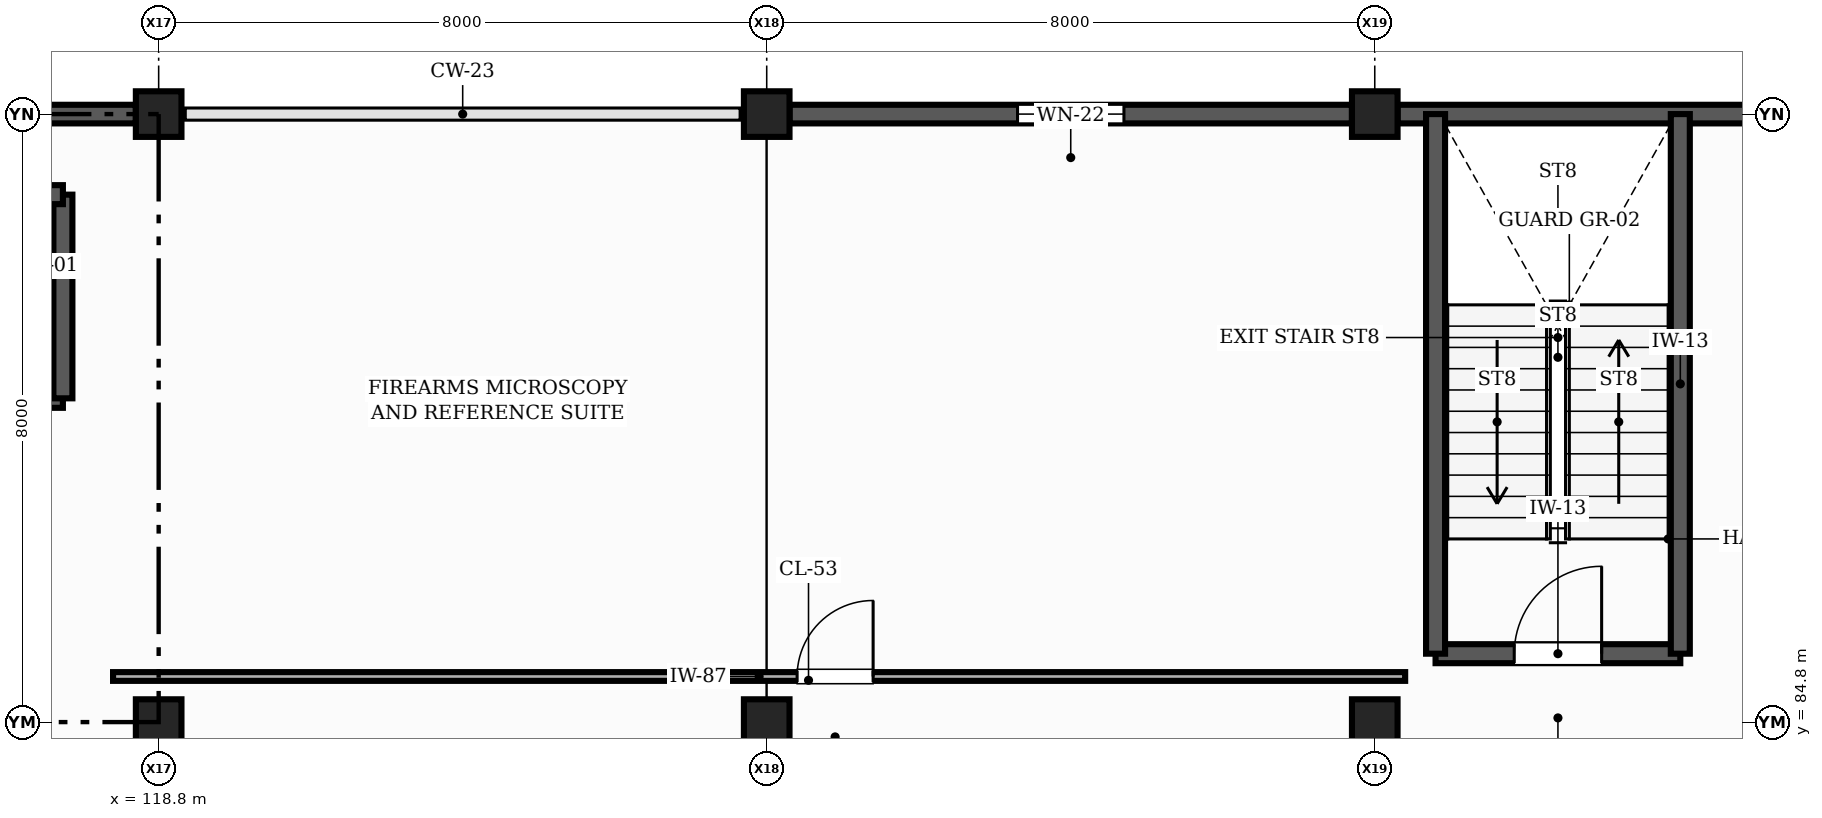
"""IFC4 building model, lengths in metres.
Left out: names, types, materials, properties, quantities, classifications, styles, units other than length and angle.
Written with IfcOpenShell. Run it as: python <this file> out.ifc"""

import sys

from ifc_helpers import new_model, si_unit, direction, frame, frame_2d, origin, origin_2d, place, context, subcontext, project, spatial, rectangle, extrude, element, fill, save


model = new_model("IFC4")
c1 = context("Model", 3, precision=1e-05, world=origin(), true_north=direction((0.0, 1.0)))
c2 = subcontext(c1, "Body", "Model", "MODEL_VIEW")
j1 = project(units=[si_unit("LENGTHUNIT", "METRE"), si_unit("PLANEANGLEUNIT", "RADIAN")], contexts=[c1])
p1 = place(None, origin())
s1 = spatial("IfcSite", under=j1, at=p1, CompositionType="ELEMENT")
p2 = place(p1, origin())
s2 = spatial("IfcBuilding", under=s1, at=p2, CompositionType="ELEMENT")
p3 = place(p2, frame((0.0, 0.0, 9.0)))
s3 = spatial("IfcBuildingStorey", under=s2, at=p3, CompositionType="ELEMENT", Elevation=9.0)
for number, where, z_axis, x_axis in (
    (1, (118.8, 84.8, 0.0), (0.0, 0.0, 1.0), (1.0, 0.0, 0.0)),
    (2, (118.8, 92.8, 0.0), (0.0, 0.0, 1.0), (1.0, 0.0, 0.0)),
    (3, (126.8, 84.8, 0.0), (0.0, 0.0, 1.0), (1.0, 0.0, 0.0)),
    (4, (126.8, 92.8, 0.0), (0.0, 0.0, 1.0), (1.0, 0.0, 0.0)),
    (5, (134.8, 84.8, 0.0), (0.0, 0.0, 1.0), (1.0, 0.0, 0.0)),
    (6, (134.8, 92.8, 0.0), (0.0, 0.0, 1.0), (1.0, 0.0, 0.0)),
):
    element("IfcColumn", number, at=place(p3, frame(where, z_axis=z_axis, x_axis=x_axis)), inside=s3, PredefinedType="COLUMN", context=c2, shape_type="SweptSolid", body=[
        extrude(rectangle(XDim=0.6, YDim=0.6, at=origin_2d()), origin(), (0.0, 0.0, 1.0), 4.5),
    ])
p4 = place(p3, frame((142.5, 92.8, 0.0), z_axis=(0.0, 0.0, 1.0), x_axis=(-1.0, 0.0, 0.0)))
e7 = element("IfcWall", 7, at=p4, inside=s3, PredefinedType="SOLIDWALL", context=c2, shape_type="SweptSolid", body=[
    extrude(rectangle(XDim=7.4, YDim=0.245, at=frame_2d((3.7, 0.0))), origin(), (0.0, 0.0, 1.0), 4.22),
])
p5 = place(p3, frame((134.5, 92.8, 0.0), z_axis=(0.0, 0.0, 1.0), x_axis=(-1.0, 0.0, 0.0)))
e8 = element("IfcWall", 8, at=p5, inside=s3, PredefinedType="SOLIDWALL", context=c2, shape_type="SweptSolid", body=[
    extrude(rectangle(XDim=7.4, YDim=0.245, at=frame_2d((3.7, 0.0))), origin(), (0.0, 0.0, 1.0), 3.57),
])
p6 = place(p5, frame((3.0, 0.0, 0.9)))
e9 = element("IfcOpeningElement", 9, at=p6, cuts=e8, PredefinedType="OPENING", context=c2, shape_type="SweptSolid", body=[
    extrude(rectangle(XDim=1.4, YDim=1.4, at=frame_2d((0.7, 0.7))), frame((0.0, 0.133, 0.0), z_axis=(0.0, -1.0, 0.0), x_axis=(1.0, 0.0, 0.0)), (0.0, 0.0, 1.0), 0.265),
])
p7 = place(p3, frame((118.5, 92.8, 0.0), z_axis=(0.0, 0.0, 1.0), x_axis=(-1.0, 0.0, 0.0)))
e10 = element("IfcWall", 10, at=p7, inside=s3, PredefinedType="SOLIDWALL", context=c2, shape_type="SweptSolid", body=[
    extrude(rectangle(XDim=7.4, YDim=0.245, at=frame_2d((3.7, 0.0))), origin(), (0.0, 0.0, 1.0), 4.22),
])
p8 = place(p3, frame((115.46, 89.06, 0.0), z_axis=(0.0, 0.0, 1.0), x_axis=(1.0, 0.0, 0.0)))
e11 = element("IfcWall", 11, at=p8, inside=s3, PredefinedType="SHEAR", context=c2, shape_type="SweptSolid", body=[
    extrude(rectangle(XDim=2.08, YDim=0.25, at=frame_2d((1.04, 0.0))), origin(), (0.0, 0.0, 1.0), 4.5),
])
p9 = place(p8, frame((0.39, 0.0, 0.0)))
e12 = element("IfcOpeningElement", 12, at=p9, cuts=e11, PredefinedType="OPENING", context=c2, shape_type="SweptSolid", body=[
    extrude(rectangle(XDim=1.3, YDim=2.25, at=frame_2d((0.65, 1.125))), frame((0.0, 0.135, 0.0), z_axis=(0.0, -1.0, 0.0), x_axis=(1.0, 0.0, 0.0)), (0.0, 0.0, 1.0), 0.27),
])
p10 = place(p3, frame((117.54, 89.06, 0.0), z_axis=(0.0, 0.0, 1.0), x_axis=(0.0, 1.0, 0.0)))
e13 = element("IfcWall", 13, at=p10, inside=s3, PredefinedType="SHEAR", context=c2, shape_type="SweptSolid", body=[
    extrude(rectangle(XDim=2.68, YDim=0.25, at=frame_2d((1.34, 0.0))), origin(), (0.0, 0.0, 1.0), 4.5),
])
p11 = place(p3, frame((117.54, 91.74, 0.0), z_axis=(0.0, 0.0, 1.0), x_axis=(-1.0, 0.0, 0.0)))
e14 = element("IfcWall", 14, at=p11, inside=s3, PredefinedType="SHEAR", context=c2, shape_type="SweptSolid", body=[
    extrude(rectangle(XDim=2.08, YDim=0.25, at=frame_2d((1.04, 0.0))), origin(), (0.0, 0.0, 1.0), 4.5),
])
p12 = place(p3, frame((135.6, 85.7, 0.0), z_axis=(0.0, 0.0, 1.0), x_axis=(1.0, 0.0, 0.0)))
e15 = element("IfcWall", 15, at=p12, inside=s3, PredefinedType="SHEAR", context=c2, shape_type="SweptSolid", body=[
    extrude(rectangle(XDim=3.22, YDim=0.25, at=frame_2d((1.61, 0.0))), origin(), (0.0, 0.0, 1.0), 4.5),
])
p13 = place(p12, frame((1.035, 0.0, 0.0)))
e16 = element("IfcOpeningElement", 16, at=p13, cuts=e15, PredefinedType="OPENING", context=c2, shape_type="SweptSolid", body=[
    extrude(rectangle(XDim=1.15, YDim=2.15, at=frame_2d((0.575, 1.075))), frame((0.0, 0.135, 0.0), z_axis=(0.0, -1.0, 0.0), x_axis=(1.0, 0.0, 0.0)), (0.0, 0.0, 1.0), 0.27),
])
for number, where, z_axis, x_axis in (
    (17, (138.82, 85.7, 0.0), (0.0, 0.0, 1.0), (0.0, 1.0, 0.0)),
    (18, (135.6, 92.8, 0.0), (0.0, 0.0, 1.0), (0.0, -1.0, 0.0)),
):
    element("IfcWall", number, at=place(p3, frame(where, z_axis=z_axis, x_axis=x_axis)), inside=s3, PredefinedType="SHEAR", context=c2, shape_type="SweptSolid", body=[
        extrude(rectangle(XDim=7.1, YDim=0.25, at=frame_2d((3.55, 0.0))), origin(), (0.0, 0.0, 1.0), 4.5),
    ])
p14 = place(p3, frame((118.2, 85.4, 0.0), z_axis=(0.0, 0.0, 1.0), x_axis=(1.0, 0.0, 0.0)))
e19 = element("IfcWall", 19, at=p14, inside=s3, PredefinedType="PARTITIONING", context=c2, shape_type="SweptSolid", body=[
    extrude(rectangle(XDim=17.0, YDim=0.115, at=frame_2d((8.5, 0.0))), origin(), (0.0, 0.0, 1.0), 3.605),
])
p15 = place(p14, frame((9.0, 0.0, 0.0)))
e20 = element("IfcOpeningElement", 20, at=p15, cuts=e19, PredefinedType="OPENING", context=c2, shape_type="SweptSolid", body=[
    extrude(rectangle(XDim=1.0, YDim=2.1, at=frame_2d((0.5, 1.05))), frame((0.0, 0.067, 0.0), z_axis=(0.0, -1.0, 0.0), x_axis=(1.0, 0.0, 0.0)), (0.0, 0.0, 1.0), 0.135),
])
p16 = place(p6, origin())
e21 = element("IfcWindow", 21, at=p16, inside=s3, PartitioningType="SINGLE_PANEL", PredefinedType="WINDOW", context=c2, shape_type="SweptSolid", body=[
    extrude(rectangle(XDim=1.4, YDim=1.4, at=frame_2d((0.7, 0.7))), frame((0.0, 0.03, 0.0), z_axis=(0.0, -1.0, 0.0), x_axis=(1.0, 0.0, 0.0)), (0.0, 0.0, 1.0), 0.06),
])
fill(e9, e21)
p17 = place(p13, origin())
e22 = element("IfcDoor", 22, at=p17, inside=s3, OperationType="SINGLE_SWING_RIGHT", PredefinedType="DOOR", context=c2, shape_type="SweptSolid", body=[
    extrude(rectangle(XDim=1.15, YDim=2.15, at=frame_2d((0.575, 1.075))), frame((0.0, 0.025, 0.0), z_axis=(0.0, -1.0, 0.0), x_axis=(1.0, 0.0, 0.0)), (0.0, 0.0, 1.0), 0.05),
])
fill(e16, e22)
p18 = place(p15, origin())
e23 = element("IfcDoor", 23, at=p18, inside=s3, OperationType="SINGLE_SWING_RIGHT", PredefinedType="DOOR", context=c2, shape_type="SweptSolid", body=[
    extrude(rectangle(XDim=1.0, YDim=2.1, at=frame_2d((0.5, 1.05))), frame((0.0, 0.025, 0.0), z_axis=(0.0, -1.0, 0.0), x_axis=(1.0, 0.0, 0.0)), (0.0, 0.0, 1.0), 0.05),
])
fill(e20, e23)
save(model, sys.argv[1])
